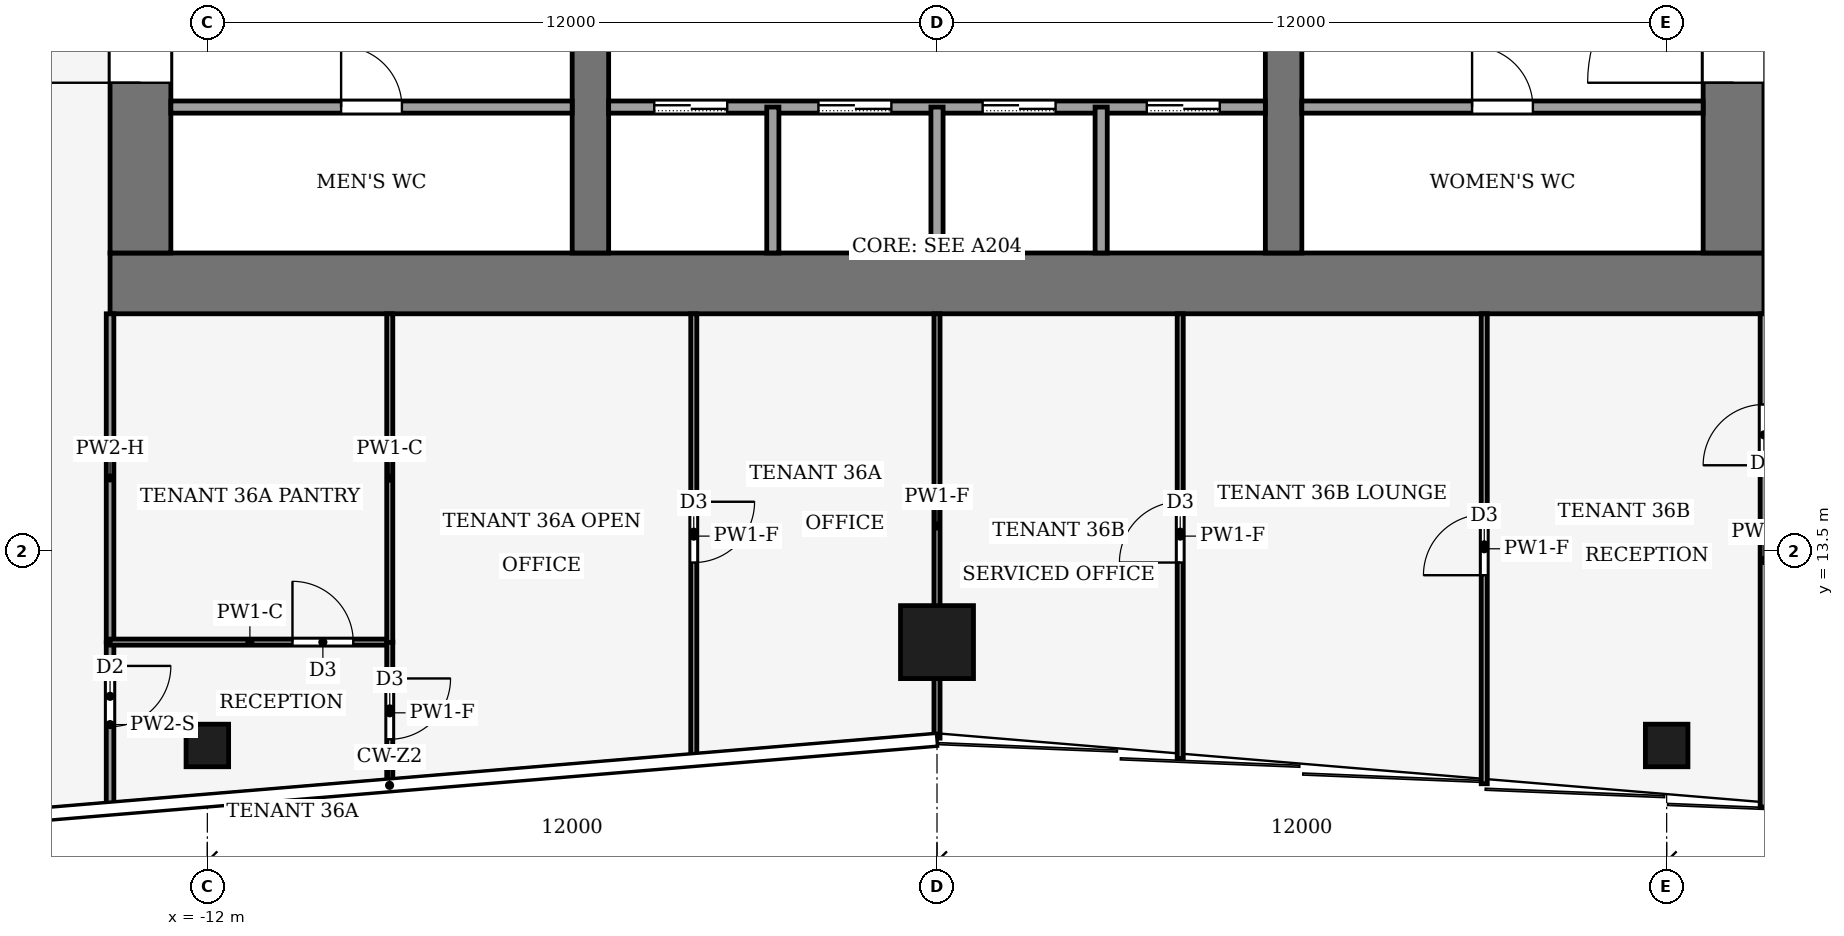
"""IFC4 building model, lengths in metres.
Left out: names, types, materials, properties, quantities, classifications, styles, units other than length and angle.
Written with IfcOpenShell. Run it as: python <this file> out.ifc"""

import sys

from ifc_helpers import new_model, si_unit, direction, frame, frame_2d, origin, origin_2d, place, context, subcontext, project, spatial, rectangle, hollow_rectangle, extrude, element, fill, save


model = new_model("IFC4")
c1 = context("Model", 3, precision=1e-05, world=origin(), true_north=direction((0.0, 1.0)))
c2 = subcontext(c1, "Body", "Model", "MODEL_VIEW")
j1 = project(units=[si_unit("LENGTHUNIT", "METRE"), si_unit("PLANEANGLEUNIT", "RADIAN")], contexts=[c1])
p1 = place(None, origin())
s1 = spatial("IfcSite", under=j1, at=p1, CompositionType="ELEMENT")
p2 = place(p1, origin())
s2 = spatial("IfcBuilding", under=s1, at=p2, CompositionType="ELEMENT")
p3 = place(p2, frame((0.0, 0.0, 158.0)))
s3 = spatial("IfcBuildingStorey", under=s2, at=p3, CompositionType="ELEMENT", Elevation=158.0)
p4 = place(p3, frame((-13.6, 17.9, -0.13), z_axis=(0.0, 0.0, 1.0), x_axis=(1.0, 0.0, 0.0)))
e1 = element("IfcWall", 1, at=p4, inside=s3, PredefinedType="SHEAR", context=c2, shape_type="SweptSolid", body=[
    extrude(rectangle(XDim=27.2, YDim=1.0, at=frame_2d((13.6, 0.0))), origin(), (0.0, 0.0, 1.0), 4.0),
])
p5 = place(p3, frame((-13.1, 18.4, -0.13), z_axis=(0.0, 0.0, 1.0), x_axis=(0.0, 1.0, 0.0)))
e2 = element("IfcWall", 2, at=p5, inside=s3, PredefinedType="SHEAR", context=c2, shape_type="SweptSolid", body=[
    extrude(rectangle(XDim=19.2, YDim=1.0, at=frame_2d((9.6, 0.0))), origin(), (0.0, 0.0, 1.0), 4.0),
])
p6 = place(p5, frame((2.8, 0.0, 0.13)))
e3 = element("IfcOpeningElement", 3, at=p6, cuts=e2, PredefinedType="OPENING", context=c2, shape_type="SweptSolid", body=[
    extrude(rectangle(XDim=2.4, YDim=2.4, at=frame_2d((1.2, 1.2))), frame((0.0, 0.51, 0.0), z_axis=(0.0, -1.0, 0.0), x_axis=(1.0, 0.0, 0.0)), (0.0, 0.0, 1.0), 1.02),
])
p7 = place(p5, frame((13.4, 0.0, 0.13)))
e4 = element("IfcOpeningElement", 4, at=p7, cuts=e2, PredefinedType="OPENING", context=c2, shape_type="SweptSolid", body=[
    extrude(rectangle(XDim=1.4, YDim=2.2, at=frame_2d((0.7, 1.1))), frame((0.0, 0.51, 0.0), z_axis=(0.0, -1.0, 0.0), x_axis=(1.0, 0.0, 0.0)), (0.0, 0.0, 1.0), 1.02),
])
p8 = place(p3, frame((13.1, 18.4, -0.13), z_axis=(0.0, 0.0, 1.0), x_axis=(0.0, 1.0, 0.0)))
e5 = element("IfcWall", 5, at=p8, inside=s3, PredefinedType="SHEAR", context=c2, shape_type="SweptSolid", body=[
    extrude(rectangle(XDim=19.2, YDim=1.0, at=frame_2d((9.6, 0.0))), origin(), (0.0, 0.0, 1.0), 4.0),
])
p9 = place(p8, frame((2.8, 0.0, 0.13)))
e6 = element("IfcOpeningElement", 6, at=p9, cuts=e5, PredefinedType="OPENING", context=c2, shape_type="SweptSolid", body=[
    extrude(rectangle(XDim=2.4, YDim=2.4, at=frame_2d((1.2, 1.2))), frame((0.0, 0.51, 0.0), z_axis=(0.0, -1.0, 0.0), x_axis=(1.0, 0.0, 0.0)), (0.0, 0.0, 1.0), 1.02),
])
p10 = place(p8, frame((13.3, 0.0, 0.13)))
e7 = element("IfcOpeningElement", 7, at=p10, cuts=e5, PredefinedType="OPENING", context=c2, shape_type="SweptSolid", body=[
    extrude(rectangle(XDim=2.4, YDim=2.4, at=frame_2d((1.2, 1.2))), frame((0.0, 0.51, 0.0), z_axis=(0.0, -1.0, 0.0), x_axis=(1.0, 0.0, 0.0)), (0.0, 0.0, 1.0), 1.02),
])
p11 = place(p3, frame((-5.7, 18.4, -0.13), z_axis=(0.0, 0.0, 1.0), x_axis=(0.0, 1.0, 0.0)))
e8 = element("IfcWall", 8, at=p11, inside=s3, PredefinedType="SHEAR", context=c2, shape_type="SweptSolid", body=[
    extrude(rectangle(XDim=19.2, YDim=0.6, at=frame_2d((9.6, 0.0))), origin(), (0.0, 0.0, 1.0), 4.0),
])
p12 = place(p11, frame((8.35, 0.0, 0.13)))
e9 = element("IfcOpeningElement", 9, at=p12, cuts=e8, PredefinedType="OPENING", context=c2, shape_type="SweptSolid", body=[
    extrude(rectangle(XDim=0.9, YDim=2.1, at=frame_2d((0.45, 1.05))), frame((0.0, 0.31, 0.0), z_axis=(0.0, -1.0, 0.0), x_axis=(1.0, 0.0, 0.0)), (0.0, 0.0, 1.0), 0.62),
])
p13 = place(p3, frame((5.7, 18.4, -0.13), z_axis=(0.0, 0.0, 1.0), x_axis=(0.0, 1.0, 0.0)))
e10 = element("IfcWall", 10, at=p13, inside=s3, PredefinedType="SHEAR", context=c2, shape_type="SweptSolid", body=[
    extrude(rectangle(XDim=19.2, YDim=0.6, at=frame_2d((9.6, 0.0))), origin(), (0.0, 0.0, 1.0), 4.0),
])
p14 = place(p13, frame((13.3, 0.0, 0.13)))
e11 = element("IfcOpeningElement", 11, at=p14, cuts=e10, PredefinedType="OPENING", context=c2, shape_type="SweptSolid", body=[
    extrude(rectangle(XDim=2.4, YDim=2.4, at=frame_2d((1.2, 1.2))), frame((0.0, 0.31, 0.0), z_axis=(0.0, -1.0, 0.0), x_axis=(1.0, 0.0, 0.0)), (0.0, 0.0, 1.0), 0.62),
])
p15 = place(p3, frame((0.0, 12.0, 0.0), z_axis=(0.0, 0.0, 1.0), x_axis=(1.0, 0.0, 0.0)))
e12 = element("IfcColumn", 12, at=p15, inside=s3, PredefinedType="COLUMN", context=c2, shape_type="SweptSolid", body=[
    extrude(hollow_rectangle(XDim=1.2, YDim=1.2, WallThickness=0.07, at=origin_2d()), origin(), (0.0, 0.0, 1.0), 4.0),
])
for number, where, z_axis, x_axis in (
    (13, (-12.0, 10.3, 0.0), (0.0, 0.0, 1.0), (1.0, 0.0, 0.0)),
    (14, (12.0, 10.3, 0.0), (0.0, 0.0, 1.0), (1.0, 0.0, 0.0)),
):
    element("IfcColumn", number, at=place(p3, frame(where, z_axis=z_axis, x_axis=x_axis)), inside=s3, PredefinedType="COLUMN", context=c2, shape_type="SweptSolid", body=[
        extrude(hollow_rectangle(XDim=0.7, YDim=0.7, WallThickness=0.03, at=origin_2d()), origin(), (0.0, 0.0, 1.0), 4.0),
    ])
p16 = place(p3, frame((-12.6, 20.8, 0.0), z_axis=(0.0, 0.0, 1.0), x_axis=(1.0, 0.0, 0.0)))
e15 = element("IfcWall", 15, at=p16, inside=s3, PredefinedType="PARTITIONING", context=c2, shape_type="SweptSolid", body=[
    extrude(rectangle(XDim=6.6, YDim=0.2, at=frame_2d((3.3, 0.0))), origin(), (0.0, 0.0, 1.0), 3.87),
])
p17 = place(p16, frame((2.8, 0.0, 0.0)))
e16 = element("IfcOpeningElement", 16, at=p17, cuts=e15, PredefinedType="OPENING", context=c2, shape_type="SweptSolid", body=[
    extrude(rectangle(XDim=1.0, YDim=2.1, at=frame_2d((0.5, 1.05))), frame((0.0, 0.11, 0.0), z_axis=(0.0, -1.0, 0.0), x_axis=(1.0, 0.0, 0.0)), (0.0, 0.0, 1.0), 0.22),
])
p18 = place(p3, frame((-5.4, 20.8, 0.0), z_axis=(0.0, 0.0, 1.0), x_axis=(1.0, 0.0, 0.0)))
e17 = element("IfcWall", 17, at=p18, inside=s3, PredefinedType="PARTITIONING", context=c2, shape_type="SweptSolid", body=[
    extrude(rectangle(XDim=10.8, YDim=0.2, at=frame_2d((5.4, 0.0))), origin(), (0.0, 0.0, 1.0), 3.87),
])
p19 = place(p18, frame((0.75, 0.0, 0.0)))
e18 = element("IfcOpeningElement", 18, at=p19, cuts=e17, PredefinedType="OPENING", context=c2, shape_type="SweptSolid", body=[
    extrude(rectangle(XDim=1.2, YDim=2.2, at=frame_2d((0.6, 1.1))), frame((0.0, 0.11, 0.0), z_axis=(0.0, -1.0, 0.0), x_axis=(1.0, 0.0, 0.0)), (0.0, 0.0, 1.0), 0.22),
])
p20 = place(p18, frame((3.45, 0.0, 0.0)))
e19 = element("IfcOpeningElement", 19, at=p20, cuts=e17, PredefinedType="OPENING", context=c2, shape_type="SweptSolid", body=[
    extrude(rectangle(XDim=1.2, YDim=2.2, at=frame_2d((0.6, 1.1))), frame((0.0, 0.11, 0.0), z_axis=(0.0, -1.0, 0.0), x_axis=(1.0, 0.0, 0.0)), (0.0, 0.0, 1.0), 0.22),
])
p21 = place(p18, frame((6.15, 0.0, 0.0)))
e20 = element("IfcOpeningElement", 20, at=p21, cuts=e17, PredefinedType="OPENING", context=c2, shape_type="SweptSolid", body=[
    extrude(rectangle(XDim=1.2, YDim=2.2, at=frame_2d((0.6, 1.1))), frame((0.0, 0.11, 0.0), z_axis=(0.0, -1.0, 0.0), x_axis=(1.0, 0.0, 0.0)), (0.0, 0.0, 1.0), 0.22),
])
p22 = place(p18, frame((8.85, 0.0, 0.0)))
e21 = element("IfcOpeningElement", 21, at=p22, cuts=e17, PredefinedType="OPENING", context=c2, shape_type="SweptSolid", body=[
    extrude(rectangle(XDim=1.2, YDim=2.2, at=frame_2d((0.6, 1.1))), frame((0.0, 0.11, 0.0), z_axis=(0.0, -1.0, 0.0), x_axis=(1.0, 0.0, 0.0)), (0.0, 0.0, 1.0), 0.22),
])
p23 = place(p3, frame((6.0, 20.8, 0.0), z_axis=(0.0, 0.0, 1.0), x_axis=(1.0, 0.0, 0.0)))
e22 = element("IfcWall", 22, at=p23, inside=s3, PredefinedType="PARTITIONING", context=c2, shape_type="SweptSolid", body=[
    extrude(rectangle(XDim=6.6, YDim=0.2, at=frame_2d((3.3, 0.0))), origin(), (0.0, 0.0, 1.0), 3.87),
])
p24 = place(p23, frame((2.8, 0.0, 0.0)))
e23 = element("IfcOpeningElement", 23, at=p24, cuts=e22, PredefinedType="OPENING", context=c2, shape_type="SweptSolid", body=[
    extrude(rectangle(XDim=1.0, YDim=2.1, at=frame_2d((0.5, 1.05))), frame((0.0, 0.11, 0.0), z_axis=(0.0, -1.0, 0.0), x_axis=(1.0, 0.0, 0.0)), (0.0, 0.0, 1.0), 0.22),
])
for number, where, z_axis, x_axis in (
    (24, (-2.7, 18.4, 0.0), (0.0, 0.0, 1.0), (0.0, 1.0, 0.0)),
    (25, (0.0, 18.4, 0.0), (0.0, 0.0, 1.0), (0.0, 1.0, 0.0)),
    (26, (2.7, 18.4, 0.0), (0.0, 0.0, 1.0), (0.0, 1.0, 0.0)),
):
    element("IfcWall", number, at=place(p3, frame(where, z_axis=z_axis, x_axis=x_axis)), inside=s3, PredefinedType="PARTITIONING", context=c2, shape_type="SweptSolid", body=[
        extrude(rectangle(XDim=2.4, YDim=0.2, at=frame_2d((1.2, 0.0))), origin(), (0.0, 0.0, 1.0), 3.87),
    ])
p25 = place(p3, frame((-13.6, 12.0, 0.0), z_axis=(0.0, 0.0, 1.0), x_axis=(0.0, -1.0, 0.0)))
e27 = element("IfcWall", 27, at=p25, inside=s3, PredefinedType="PARTITIONING", context=c2, shape_type="SweptSolid", body=[
    extrude(rectangle(XDim=2.713, YDim=0.125, at=frame_2d((1.357, 0.0))), origin(), (0.0, 0.0, 1.0), 3.04),
])
p26 = place(p25, frame((0.392, 0.0, 0.0)))
e28 = element("IfcOpeningElement", 28, at=p26, cuts=e27, PredefinedType="OPENING", context=c2, shape_type="SweptSolid", body=[
    extrude(rectangle(XDim=1.0, YDim=2.1, at=frame_2d((0.5, 1.05))), frame((0.0, 0.073, 0.0), z_axis=(0.0, -1.0, 0.0), x_axis=(1.0, 0.0, 0.0)), (0.0, 0.0, 1.0), 0.145),
])
p27 = place(p3, frame((-13.6, 12.0, 0.0), z_axis=(0.0, 0.0, 1.0), x_axis=(0.0, 1.0, 0.0)))
e29 = element("IfcWall", 29, at=p27, inside=s3, PredefinedType="PARTITIONING", context=c2, shape_type="SweptSolid", body=[
    extrude(rectangle(XDim=5.4, YDim=0.125, at=frame_2d((2.7, 0.0))), origin(), (0.0, 0.0, 1.0), 3.14),
])
p28 = place(p3, frame((13.6, 9.287, 0.0), z_axis=(0.0, 0.0, 1.0), x_axis=(0.0, 1.0, 0.0)))
e30 = element("IfcWall", 30, at=p28, inside=s3, PredefinedType="PARTITIONING", context=c2, shape_type="SweptSolid", body=[
    extrude(rectangle(XDim=8.113, YDim=0.125, at=frame_2d((4.057, 0.0))), origin(), (0.0, 0.0, 1.0), 3.04),
])
p29 = place(p28, frame((5.622, 0.0, 0.0)))
e31 = element("IfcOpeningElement", 31, at=p29, cuts=e30, PredefinedType="OPENING", context=c2, shape_type="SweptSolid", body=[
    extrude(rectangle(XDim=1.0, YDim=2.1, at=frame_2d((0.5, 1.05))), frame((0.0, 0.073, 0.0), z_axis=(0.0, -1.0, 0.0), x_axis=(1.0, 0.0, 0.0)), (0.0, 0.0, 1.0), 0.145),
])
p30 = place(p3, frame((-13.6, 12.0, 0.0), z_axis=(0.0, 0.0, 1.0), x_axis=(1.0, 0.0, 0.0)))
e32 = element("IfcWall", 32, at=p30, inside=s3, PredefinedType="PARTITIONING", context=c2, shape_type="SweptSolid", body=[
    extrude(rectangle(XDim=4.6, YDim=0.1, at=frame_2d((2.3, 0.0))), origin(), (0.0, 0.0, 1.0), 3.87),
])
p31 = place(p30, frame((3.0, 0.0, 0.0)))
e33 = element("IfcOpeningElement", 33, at=p31, cuts=e32, PredefinedType="OPENING", context=c2, shape_type="SweptSolid", body=[
    extrude(rectangle(XDim=1.0, YDim=2.1, at=frame_2d((0.5, 1.05))), frame((0.0, 0.06, 0.0), z_axis=(0.0, -1.0, 0.0), x_axis=(1.0, 0.0, 0.0)), (0.0, 0.0, 1.0), 0.12),
])
p32 = place(p3, frame((-9.0, 12.004, 0.0), z_axis=(0.0, 0.0, 1.0), x_axis=(0.0, -1.0, 0.0)))
e34 = element("IfcWall", 34, at=p32, inside=s3, PredefinedType="PARTITIONING", context=c2, shape_type="SweptSolid", body=[
    extrude(rectangle(XDim=2.334, YDim=0.1, at=frame_2d((1.167, 0.0))), origin(), (0.0, 0.0, 1.0), 3.04),
])
p33 = place(p32, frame((0.602, 0.0, 0.0)))
e35 = element("IfcOpeningElement", 35, at=p33, cuts=e34, PredefinedType="OPENING", context=c2, shape_type="SweptSolid", body=[
    extrude(rectangle(XDim=1.0, YDim=2.1, at=frame_2d((0.5, 1.05))), frame((0.0, 0.06, 0.0), z_axis=(0.0, -1.0, 0.0), x_axis=(1.0, 0.0, 0.0)), (0.0, 0.0, 1.0), 0.12),
])
p34 = place(p3, frame((-9.0, 11.996, 0.0), z_axis=(0.0, 0.0, 1.0), x_axis=(0.0, 1.0, 0.0)))
e36 = element("IfcWall", 36, at=p34, inside=s3, PredefinedType="PARTITIONING", context=c2, shape_type="SweptSolid", body=[
    extrude(rectangle(XDim=5.404, YDim=0.1, at=frame_2d((2.702, 0.0))), origin(), (0.0, 0.0, 1.0), 3.87),
])
p35 = place(p3, frame((-4.0, 17.4, 0.0), z_axis=(0.0, 0.0, 1.0), x_axis=(0.0, -1.0, 0.0)))
e37 = element("IfcWall", 37, at=p35, inside=s3, PredefinedType="PARTITIONING", context=c2, shape_type="SweptSolid", body=[
    extrude(rectangle(XDim=7.313, YDim=0.1, at=frame_2d((3.657, 0.0))), origin(), (0.0, 0.0, 1.0), 3.04),
])
p36 = place(p35, frame((3.092, 0.0, 0.0)))
e38 = element("IfcOpeningElement", 38, at=p36, cuts=e37, PredefinedType="OPENING", context=c2, shape_type="SweptSolid", body=[
    extrude(rectangle(XDim=1.0, YDim=2.1, at=frame_2d((0.5, 1.05))), frame((0.0, 0.06, 0.0), z_axis=(0.0, -1.0, 0.0), x_axis=(1.0, 0.0, 0.0)), (0.0, 0.0, 1.0), 0.12),
])
p37 = place(p3, frame((0.0, 10.42, 0.0), z_axis=(0.0, 0.0, 1.0), x_axis=(0.0, 1.0, 0.0)))
e39 = element("IfcWall", 39, at=p37, inside=s3, PredefinedType="PARTITIONING", context=c2, shape_type="SweptSolid", body=[
    extrude(rectangle(XDim=6.98, YDim=0.1, at=frame_2d((3.49, 0.0))), origin(), (0.0, 0.0, 1.0), 3.04),
])
p38 = place(p3, frame((9.0, 9.67, 0.0), z_axis=(0.0, 0.0, 1.0), x_axis=(0.0, 1.0, 0.0)))
e40 = element("IfcWall", 40, at=p38, inside=s3, PredefinedType="PARTITIONING", context=c2, shape_type="SweptSolid", body=[
    extrude(rectangle(XDim=7.73, YDim=0.1, at=frame_2d((3.865, 0.0))), origin(), (0.0, 0.0, 1.0), 3.04),
])
p39 = place(p38, frame((3.43, 0.0, 0.0)))
e41 = element("IfcOpeningElement", 41, at=p39, cuts=e40, PredefinedType="OPENING", context=c2, shape_type="SweptSolid", body=[
    extrude(rectangle(XDim=1.0, YDim=2.1, at=frame_2d((0.5, 1.05))), frame((0.0, 0.06, 0.0), z_axis=(0.0, -1.0, 0.0), x_axis=(1.0, 0.0, 0.0)), (0.0, 0.0, 1.0), 0.12),
])
p40 = place(p3, frame((4.0, 10.087, 0.0), z_axis=(0.0, 0.0, 1.0), x_axis=(0.0, 1.0, 0.0)))
e42 = element("IfcWall", 42, at=p40, inside=s3, PredefinedType="PARTITIONING", context=c2, shape_type="SweptSolid", body=[
    extrude(rectangle(XDim=7.313, YDim=0.1, at=frame_2d((3.657, 0.0))), origin(), (0.0, 0.0, 1.0), 3.04),
])
p41 = place(p40, frame((3.222, 0.0, 0.0)))
e43 = element("IfcOpeningElement", 43, at=p41, cuts=e42, PredefinedType="OPENING", context=c2, shape_type="SweptSolid", body=[
    extrude(rectangle(XDim=1.0, YDim=2.1, at=frame_2d((0.5, 1.05))), frame((0.0, 0.06, 0.0), z_axis=(0.0, -1.0, 0.0), x_axis=(1.0, 0.0, 0.0)), (0.0, 0.0, 1.0), 0.12),
])
p42 = place(p19, origin())
e44 = element("IfcDoor", 44, at=p42, inside=s3, OperationType="SLIDING_TO_LEFT", PredefinedType="DOOR", context=c2, shape_type="SweptSolid", body=[
    extrude(rectangle(XDim=1.2, YDim=2.2, at=frame_2d((0.6, 1.1))), frame((0.0, 0.025, 0.0), z_axis=(0.0, -1.0, 0.0), x_axis=(1.0, 0.0, 0.0)), (0.0, 0.0, 1.0), 0.05),
])
fill(e18, e44)
p43 = place(p20, origin())
e45 = element("IfcDoor", 45, at=p43, inside=s3, OperationType="SLIDING_TO_LEFT", PredefinedType="DOOR", context=c2, shape_type="SweptSolid", body=[
    extrude(rectangle(XDim=1.2, YDim=2.2, at=frame_2d((0.6, 1.1))), frame((0.0, 0.025, 0.0), z_axis=(0.0, -1.0, 0.0), x_axis=(1.0, 0.0, 0.0)), (0.0, 0.0, 1.0), 0.05),
])
fill(e19, e45)
p44 = place(p21, origin())
e46 = element("IfcDoor", 46, at=p44, inside=s3, OperationType="SLIDING_TO_LEFT", PredefinedType="DOOR", context=c2, shape_type="SweptSolid", body=[
    extrude(rectangle(XDim=1.2, YDim=2.2, at=frame_2d((0.6, 1.1))), frame((0.0, 0.025, 0.0), z_axis=(0.0, -1.0, 0.0), x_axis=(1.0, 0.0, 0.0)), (0.0, 0.0, 1.0), 0.05),
])
fill(e20, e46)
p45 = place(p22, origin())
e47 = element("IfcDoor", 47, at=p45, inside=s3, OperationType="SLIDING_TO_LEFT", PredefinedType="DOOR", context=c2, shape_type="SweptSolid", body=[
    extrude(rectangle(XDim=1.2, YDim=2.2, at=frame_2d((0.6, 1.1))), frame((0.0, 0.025, 0.0), z_axis=(0.0, -1.0, 0.0), x_axis=(1.0, 0.0, 0.0)), (0.0, 0.0, 1.0), 0.05),
])
fill(e21, e47)
p46 = place(p17, origin())
e48 = element("IfcDoor", 48, at=p46, inside=s3, OperationType="SINGLE_SWING_LEFT", PredefinedType="DOOR", context=c2, shape_type="SweptSolid", body=[
    extrude(rectangle(XDim=1.0, YDim=2.1, at=frame_2d((0.5, 1.05))), frame((0.0, 0.025, 0.0), z_axis=(0.0, -1.0, 0.0), x_axis=(1.0, 0.0, 0.0)), (0.0, 0.0, 1.0), 0.05),
])
fill(e16, e48)
p47 = place(p24, origin())
e49 = element("IfcDoor", 49, at=p47, inside=s3, OperationType="SINGLE_SWING_RIGHT", PredefinedType="DOOR", context=c2, shape_type="SweptSolid", body=[
    extrude(rectangle(XDim=1.0, YDim=2.1, at=frame_2d((0.5, 1.05))), frame((0.0, 0.025, 0.0), z_axis=(0.0, -1.0, 0.0), x_axis=(1.0, 0.0, 0.0)), (0.0, 0.0, 1.0), 0.05),
])
fill(e23, e49)
p48 = place(p6, origin())
e50 = element("IfcDoor", 50, at=p48, inside=s3, OperationType="DOUBLE_DOOR_SINGLE_SWING", PredefinedType="DOOR", context=c2, shape_type="SweptSolid", body=[
    extrude(rectangle(XDim=2.4, YDim=2.4, at=frame_2d((1.2, 1.2))), frame((0.0, 0.025, 0.0), z_axis=(0.0, -1.0, 0.0), x_axis=(1.0, 0.0, 0.0)), (0.0, 0.0, 1.0), 0.05),
])
fill(e3, e50)
p49 = place(p9, origin())
e51 = element("IfcDoor", 51, at=p49, inside=s3, OperationType="DOUBLE_DOOR_SINGLE_SWING", PredefinedType="DOOR", context=c2, shape_type="SweptSolid", body=[
    extrude(rectangle(XDim=2.4, YDim=2.4, at=frame_2d((1.2, 1.2))), frame((0.0, 0.025, 0.0), z_axis=(0.0, -1.0, 0.0), x_axis=(1.0, 0.0, 0.0)), (0.0, 0.0, 1.0), 0.05),
])
fill(e6, e51)
p50 = place(p26, origin())
e52 = element("IfcDoor", 52, at=p50, inside=s3, OperationType="SINGLE_SWING_LEFT", PredefinedType="DOOR", context=c2, shape_type="SweptSolid", body=[
    extrude(rectangle(XDim=1.0, YDim=2.1, at=frame_2d((0.5, 1.05))), frame((0.0, 0.025, 0.0), z_axis=(0.0, -1.0, 0.0), x_axis=(1.0, 0.0, 0.0)), (0.0, 0.0, 1.0), 0.05),
])
fill(e28, e52)
p51 = place(p29, origin())
e53 = element("IfcDoor", 53, at=p51, inside=s3, OperationType="SINGLE_SWING_RIGHT", PredefinedType="DOOR", context=c2, shape_type="SweptSolid", body=[
    extrude(rectangle(XDim=1.0, YDim=2.1, at=frame_2d((0.5, 1.05))), frame((0.0, 0.025, 0.0), z_axis=(0.0, -1.0, 0.0), x_axis=(1.0, 0.0, 0.0)), (0.0, 0.0, 1.0), 0.05),
])
fill(e31, e53)
p52 = place(p31, origin())
e54 = element("IfcDoor", 54, at=p52, inside=s3, OperationType="SINGLE_SWING_RIGHT", PredefinedType="DOOR", context=c2, shape_type="SweptSolid", body=[
    extrude(rectangle(XDim=1.0, YDim=2.1, at=frame_2d((0.5, 1.05))), frame((0.0, 0.025, 0.0), z_axis=(0.0, -1.0, 0.0), x_axis=(1.0, 0.0, 0.0)), (0.0, 0.0, 1.0), 0.05),
])
fill(e33, e54)
p53 = place(p33, origin())
e55 = element("IfcDoor", 55, at=p53, inside=s3, OperationType="SINGLE_SWING_LEFT", PredefinedType="DOOR", context=c2, shape_type="SweptSolid", body=[
    extrude(rectangle(XDim=1.0, YDim=2.1, at=frame_2d((0.5, 1.05))), frame((0.0, 0.025, 0.0), z_axis=(0.0, -1.0, 0.0), x_axis=(1.0, 0.0, 0.0)), (0.0, 0.0, 1.0), 0.05),
])
fill(e35, e55)
p54 = place(p36, origin())
e56 = element("IfcDoor", 56, at=p54, inside=s3, OperationType="SINGLE_SWING_LEFT", PredefinedType="DOOR", context=c2, shape_type="SweptSolid", body=[
    extrude(rectangle(XDim=1.0, YDim=2.1, at=frame_2d((0.5, 1.05))), frame((0.0, 0.025, 0.0), z_axis=(0.0, -1.0, 0.0), x_axis=(1.0, 0.0, 0.0)), (0.0, 0.0, 1.0), 0.05),
])
fill(e38, e56)
p55 = place(p39, origin())
e57 = element("IfcDoor", 57, at=p55, inside=s3, OperationType="SINGLE_SWING_RIGHT", PredefinedType="DOOR", context=c2, shape_type="SweptSolid", body=[
    extrude(rectangle(XDim=1.0, YDim=2.1, at=frame_2d((0.5, 1.05))), frame((0.0, 0.025, 0.0), z_axis=(0.0, -1.0, 0.0), x_axis=(1.0, 0.0, 0.0)), (0.0, 0.0, 1.0), 0.05),
])
fill(e41, e57)
p56 = place(p41, origin())
e58 = element("IfcDoor", 58, at=p56, inside=s3, OperationType="SINGLE_SWING_RIGHT", PredefinedType="DOOR", context=c2, shape_type="SweptSolid", body=[
    extrude(rectangle(XDim=1.0, YDim=2.1, at=frame_2d((0.5, 1.05))), frame((0.0, 0.025, 0.0), z_axis=(0.0, -1.0, 0.0), x_axis=(1.0, 0.0, 0.0)), (0.0, 0.0, 1.0), 0.05),
])
fill(e43, e58)
save(model, sys.argv[1])
